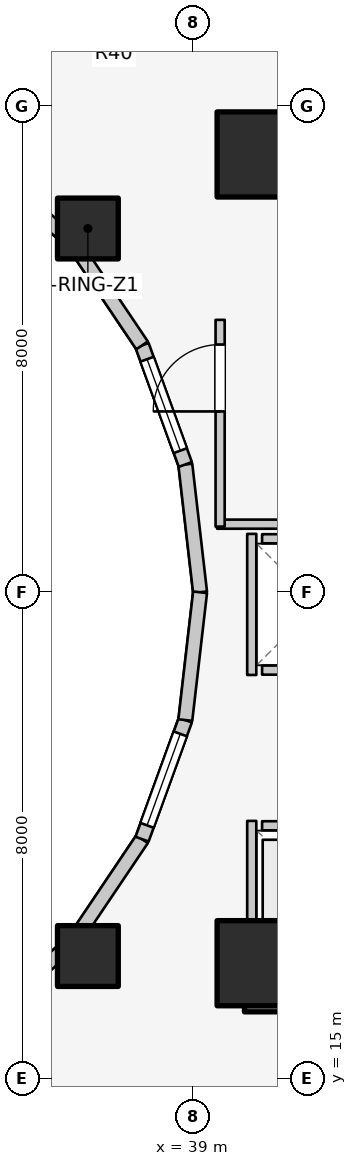
"""IFC4 building model, lengths in metres.
Left out: names, types, materials, properties, quantities, classifications, styles, units other than length and angle.
Written with IfcOpenShell. Run it as: python <this file> out.ifc"""

import sys

from ifc_helpers import new_model, si_unit, direction, frame, frame_2d, origin, origin_2d, place, context, subcontext, project, spatial, rectangle, extrude, element, fill, save


model = new_model("IFC4")
c1 = context("Model", 3, precision=1e-05, world=origin(), true_north=direction((0.0, 1.0)))
c2 = subcontext(c1, "Body", "Model", "MODEL_VIEW")
j1 = project(units=[si_unit("LENGTHUNIT", "METRE"), si_unit("PLANEANGLEUNIT", "RADIAN")], contexts=[c1])
p1 = place(None, origin())
s1 = spatial("IfcSite", under=j1, at=p1, CompositionType="ELEMENT")
p2 = place(p1, origin())
s2 = spatial("IfcBuilding", under=s1, at=p2, CompositionType="ELEMENT")
p3 = place(p2, frame((0.0, 0.0, 36.9)))
s3 = spatial("IfcBuildingStorey", under=s2, at=p3, CompositionType="ELEMENT", Elevation=36.9)
for number, where, z_axis, x_axis in (
    (1, (39.85, 16.55, 0.0), (0.0, 0.0, 1.0), (1.0, 0.0, 0.0)),
    (2, (39.85, 30.35, 0.0), (0.0, 0.0, 1.0), (1.0, 0.0, 0.0)),
):
    element("IfcWall", number, at=place(p3, frame(where, z_axis=z_axis, x_axis=x_axis)), inside=s3, PredefinedType="SHEAR", context=c2, shape_type="SweptSolid", body=[
        extrude(rectangle(XDim=4.5, YDim=0.9, at=frame_2d((2.25, 0.0))), origin(), (0.0, 0.0, 1.0), 3.1),
    ])
for number, where, z_axis, x_axis in (
    (3, (40.1, 16.9, 0.0), (0.0, 0.0, 1.0), (1.0, 0.0, 0.0)),
    (4, (40.1, 30.2, 0.0), (0.0, 0.0, 1.0), (1.0, 0.0, 0.0)),
):
    element("IfcColumn", number, at=place(p3, frame(where, z_axis=z_axis, x_axis=x_axis)), inside=s3, PredefinedType="COLUMN", context=c2, shape_type="SweptSolid", body=[
        extrude(rectangle(XDim=1.4, YDim=1.4, at=origin_2d()), origin(), (0.0, 0.0, 1.0), 3.1),
    ])
for number, where, z_axis, x_axis in (
    (5, (37.275, 28.982, 0.0), (0.0, 0.0, 1.0), (1.0, 0.0, 0.0)),
    (6, (37.275, 17.018, 0.0), (0.0, 0.0, 1.0), (1.0, 0.0, 0.0)),
):
    element("IfcColumn", number, at=place(p3, frame(where, z_axis=z_axis, x_axis=x_axis)), inside=s3, PredefinedType="COLUMN", context=c2, shape_type="SweptSolid", body=[
        extrude(rectangle(XDim=1.0, YDim=1.0, at=origin_2d()), origin(), (0.0, 0.0, 1.0), 3.1),
    ])
p4 = place(p3, frame((39.12, 23.0, 0.0), z_axis=(0.0, 0.0, 1.0), x_axis=(-0.114711713601, 0.993398823617, 0.0)))
e7 = element("IfcWall", 7, at=p4, inside=s3, PredefinedType="STANDARD", context=c2, shape_type="SweptSolid", body=[
    extrude(rectangle(XDim=2.115, YDim=0.23, at=frame_2d((1.058, 0.0))), origin(), (0.0, 0.0, 1.0), 2.84),
])
p5 = place(p3, frame((38.877, 25.102, 0.0), z_axis=(0.0, 0.0, 1.0), x_axis=(-0.341423187295, 0.93990968033, 0.0)))
e8 = element("IfcWall", 8, at=p5, inside=s3, PredefinedType="STANDARD", context=c2, shape_type="SweptSolid", body=[
    extrude(rectangle(XDim=2.084, YDim=0.23, at=frame_2d((1.042, 0.0))), origin(), (0.0, 0.0, 1.0), 2.84),
])
p6 = place(p5, frame((0.242, 0.0, 0.85)))
e9 = element("IfcOpeningElement", 9, at=p6, cuts=e8, PredefinedType="OPENING", context=c2, shape_type="SweptSolid", body=[
    extrude(rectangle(XDim=1.6, YDim=1.65, at=frame_2d((0.8, 0.825))), frame((0.0, 0.125, 0.0), z_axis=(0.0, -1.0, 0.0), x_axis=(1.0, 0.0, 0.0)), (0.0, 0.0, 1.0), 0.25),
])
p7 = place(p3, frame((38.166, 27.06, 0.0), z_axis=(0.0, 0.0, 1.0), x_axis=(-0.558197800898, 0.829707909492, 0.0)))
e10 = element("IfcWall", 10, at=p7, inside=s3, PredefinedType="STANDARD", context=c2, shape_type="SweptSolid", body=[
    extrude(rectangle(XDim=2.027, YDim=0.23, at=frame_2d((1.013, 0.0))), origin(), (0.0, 0.0, 1.0), 2.16),
])
for number, where, z_axis, x_axis in (
    (11, (37.035, 28.742, 0.0), (0.0, 0.0, 1.0), (-0.753, 0.659, 0.0)),
    (12, (35.56, 15.968, 0.0), (0.0, 0.0, 1.0), (0.753, 0.659, 0.0)),
):
    element("IfcWall", number, at=place(p3, frame(where, z_axis=z_axis, x_axis=x_axis)), inside=s3, PredefinedType="STANDARD", context=c2, shape_type="SweptSolid", body=[
        extrude(rectangle(XDim=1.959, YDim=0.23, at=frame_2d((0.98, 0.0))), origin(), (0.0, 0.0, 1.0), 2.16),
    ])
p8 = place(p3, frame((37.035, 17.258, 0.0), z_axis=(0.0, 0.0, 1.0), x_axis=(0.558197800898, 0.829707909492, 0.0)))
e13 = element("IfcWall", 13, at=p8, inside=s3, PredefinedType="STANDARD", context=c2, shape_type="SweptSolid", body=[
    extrude(rectangle(XDim=2.027, YDim=0.23, at=frame_2d((1.013, 0.0))), origin(), (0.0, 0.0, 1.0), 2.16),
])
p9 = place(p3, frame((38.166, 18.94, 0.0), z_axis=(0.0, 0.0, 1.0), x_axis=(0.341423187295, 0.93990968033, 0.0)))
e14 = element("IfcWall", 14, at=p9, inside=s3, PredefinedType="STANDARD", context=c2, shape_type="SweptSolid", body=[
    extrude(rectangle(XDim=2.084, YDim=0.23, at=frame_2d((1.042, 0.0))), origin(), (0.0, 0.0, 1.0), 2.84),
])
p10 = place(p9, frame((0.242, 0.0, 0.85)))
e15 = element("IfcOpeningElement", 15, at=p10, cuts=e14, PredefinedType="OPENING", context=c2, shape_type="SweptSolid", body=[
    extrude(rectangle(XDim=1.6, YDim=1.65, at=frame_2d((0.8, 0.825))), frame((0.0, 0.125, 0.0), z_axis=(0.0, -1.0, 0.0), x_axis=(1.0, 0.0, 0.0)), (0.0, 0.0, 1.0), 0.25),
])
p11 = place(p3, frame((38.877, 20.898, 0.0), z_axis=(0.0, 0.0, 1.0), x_axis=(0.114711713601, 0.993398823617, 0.0)))
e16 = element("IfcWall", 16, at=p11, inside=s3, PredefinedType="STANDARD", context=c2, shape_type="SweptSolid", body=[
    extrude(rectangle(XDim=2.115, YDim=0.23, at=frame_2d((1.058, 0.0))), origin(), (0.0, 0.0, 1.0), 2.84),
])
p12 = place(p3, frame((40.14, 19.16, 0.0), z_axis=(0.0, 0.0, 1.0), x_axis=(1.0, 0.0, 0.0)))
e17 = element("IfcWall", 17, at=p12, inside=s3, PredefinedType="SOLIDWALL", context=c2, shape_type="SweptSolid", body=[
    extrude(rectangle(XDim=1.82, YDim=0.15, at=frame_2d((0.91, 0.0))), origin(), (0.0, 0.0, 1.0), 2.12),
])
p13 = place(p12, frame((0.36, 0.0, 0.0)))
e18 = element("IfcOpeningElement", 18, at=p13, cuts=e17, PredefinedType="OPENING", context=c2, shape_type="SweptSolid", body=[
    extrude(rectangle(XDim=1.1, YDim=2.1, at=frame_2d((0.55, 1.05))), frame((0.0, 0.085, 0.0), z_axis=(0.0, -1.0, 0.0), x_axis=(1.0, 0.0, 0.0)), (0.0, 0.0, 1.0), 0.17),
])
p14 = place(p3, frame((40.14, 17.1, 0.0), z_axis=(0.0, 0.0, 1.0), x_axis=(1.0, 0.0, 0.0)))
e19 = element("IfcWall", 19, at=p14, inside=s3, PredefinedType="SOLIDWALL", context=c2, shape_type="SweptSolid", body=[
    extrude(rectangle(XDim=1.82, YDim=0.15, at=frame_2d((0.91, 0.0))), origin(), (0.0, 0.0, 1.0), 2.12),
])
p15 = place(p3, frame((39.97, 17.02, 0.0), z_axis=(0.0, 0.0, 1.0), x_axis=(0.0, 1.0, 0.0)))
e20 = element("IfcWall", 20, at=p15, inside=s3, PredefinedType="SOLIDWALL", context=c2, shape_type="SweptSolid", body=[
    extrude(rectangle(XDim=2.22, YDim=0.15, at=frame_2d((1.11, 0.0))), origin(), (0.0, 0.0, 1.0), 2.12),
])
for number, where, z_axis, x_axis in (
    (21, (40.14, 21.72, 0.0), (0.0, 0.0, 1.0), (1.0, 0.0, 0.0)),
    (22, (40.14, 23.88, 0.0), (0.0, 0.0, 1.0), (1.0, 0.0, 0.0)),
):
    element("IfcWall", number, at=place(p3, frame(where, z_axis=z_axis, x_axis=x_axis)), inside=s3, PredefinedType="SOLIDWALL", context=c2, shape_type="SweptSolid", body=[
        extrude(rectangle(XDim=1.82, YDim=0.15, at=frame_2d((0.91, 0.0))), origin(), (0.0, 0.0, 1.0), 2.12),
    ])
p16 = place(p3, frame((39.97, 21.64, 0.0), z_axis=(0.0, 0.0, 1.0), x_axis=(0.0, 1.0, 0.0)))
e23 = element("IfcWall", 23, at=p16, inside=s3, PredefinedType="SOLIDWALL", context=c2, shape_type="SweptSolid", body=[
    extrude(rectangle(XDim=2.32, YDim=0.15, at=frame_2d((1.16, 0.0))), origin(), (0.0, 0.0, 1.0), 2.12),
])
p17 = place(p3, frame((39.4, 24.12, 0.0), z_axis=(0.0, 0.0, 1.0), x_axis=(1.0, 0.0, 0.0)))
e24 = element("IfcWall", 24, at=p17, inside=s3, PredefinedType="PARTITIONING", context=c2, shape_type="SweptSolid", body=[
    extrude(rectangle(XDim=5.08, YDim=0.15, at=frame_2d((2.54, 0.0))), origin(), (0.0, 0.0, 1.0), 2.12),
])
p18 = place(p3, frame((39.45, 24.08, 0.0), z_axis=(0.0, 0.0, 1.0), x_axis=(0.0, 1.0, 0.0)))
e25 = element("IfcWall", 25, at=p18, inside=s3, PredefinedType="PARTITIONING", context=c2, shape_type="SweptSolid", body=[
    extrude(rectangle(XDim=3.4, YDim=0.15, at=frame_2d((1.7, 0.0))), origin(), (0.0, 0.0, 1.0), 2.855),
])
p19 = place(p18, frame((1.894, 0.0, 0.0)))
e26 = element("IfcOpeningElement", 26, at=p19, cuts=e25, PredefinedType="OPENING", context=c2, shape_type="SweptSolid", body=[
    extrude(rectangle(XDim=1.1, YDim=2.1, at=frame_2d((0.55, 1.05))), frame((0.0, 0.085, 0.0), z_axis=(0.0, -1.0, 0.0), x_axis=(1.0, 0.0, 0.0)), (0.0, 0.0, 1.0), 0.17),
])
p20 = place(p6, origin())
e27 = element("IfcWindow", 27, at=p20, inside=s3, PartitioningType="SINGLE_PANEL", PredefinedType="WINDOW", context=c2, shape_type="SweptSolid", body=[
    extrude(rectangle(XDim=1.6, YDim=1.65, at=frame_2d((0.8, 0.825))), frame((0.0, 0.03, 0.0), z_axis=(0.0, -1.0, 0.0), x_axis=(1.0, 0.0, 0.0)), (0.0, 0.0, 1.0), 0.06),
])
fill(e9, e27)
p21 = place(p10, origin())
e28 = element("IfcWindow", 28, at=p21, inside=s3, PartitioningType="SINGLE_PANEL", PredefinedType="WINDOW", context=c2, shape_type="SweptSolid", body=[
    extrude(rectangle(XDim=1.6, YDim=1.65, at=frame_2d((0.8, 0.825))), frame((0.0, 0.03, 0.0), z_axis=(0.0, -1.0, 0.0), x_axis=(1.0, 0.0, 0.0)), (0.0, 0.0, 1.0), 0.06),
])
fill(e15, e28)
p22 = place(p19, origin())
e29 = element("IfcDoor", 29, at=p22, inside=s3, OperationType="SINGLE_SWING_LEFT", PredefinedType="DOOR", context=c2, shape_type="SweptSolid", body=[
    extrude(rectangle(XDim=1.1, YDim=2.1, at=frame_2d((0.55, 1.05))), frame((0.0, 0.025, 0.0), z_axis=(0.0, -1.0, 0.0), x_axis=(1.0, 0.0, 0.0)), (0.0, 0.0, 1.0), 0.05),
])
fill(e26, e29)
save(model, sys.argv[1])
